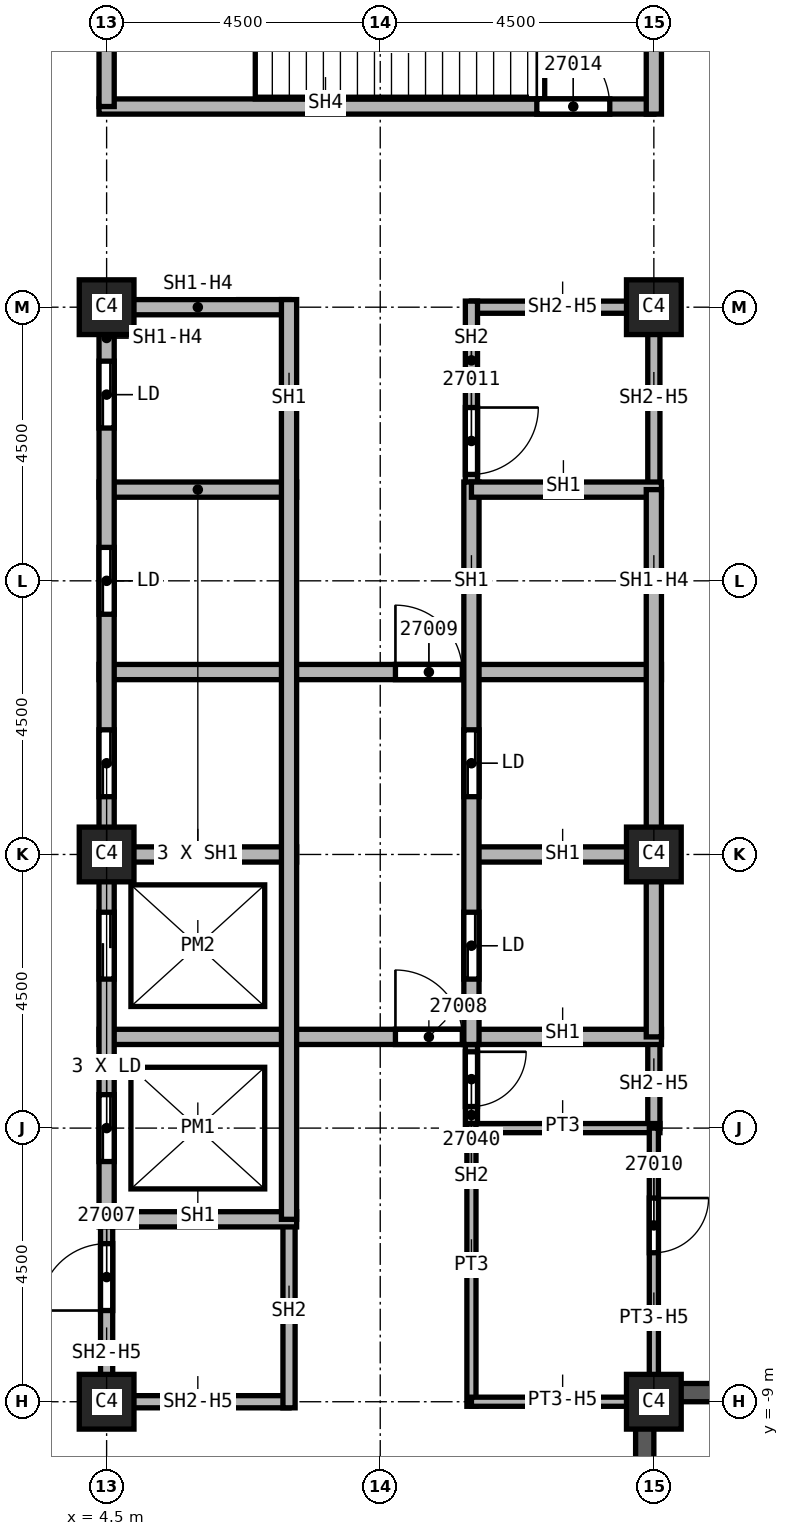
"""IFC4 building model, lengths in metres.
Left out: names, types, materials, properties, quantities, classifications, styles, units other than length and angle.
Written with IfcOpenShell. Run it as: python <this file> out.ifc"""

import sys

from ifc_helpers import new_model, si_unit, direction, frame, frame_2d, origin, origin_2d, place, context, subcontext, project, spatial, rectangle, extrude, element, fill, save


model = new_model("IFC4")
c1 = context("Model", 3, precision=1e-05, world=origin(), true_north=direction((0.0, 1.0)))
c2 = subcontext(c1, "Body", "Model", "MODEL_VIEW")
j1 = project(units=[si_unit("LENGTHUNIT", "METRE"), si_unit("PLANEANGLEUNIT", "RADIAN")], contexts=[c1])
p1 = place(None, origin())
s1 = spatial("IfcSite", under=j1, at=p1, CompositionType="ELEMENT")
p2 = place(p1, origin())
s2 = spatial("IfcBuilding", under=s1, at=p2, CompositionType="ELEMENT")
p3 = place(p2, frame((0.0, 0.0, 178.0)))
s3 = spatial("IfcBuildingStorey", under=s2, at=p3, CompositionType="ELEMENT", Elevation=178.0)
for number, where, z_axis, x_axis in (
    (1, (4.5, 0.0, 0.0), (0.0, 0.0, 1.0), (1.0, 0.0, 0.0)),
    (2, (4.5, 9.0, 0.0), (0.0, 0.0, 1.0), (1.0, 0.0, 0.0)),
    (3, (4.5, -9.0, 0.0), (0.0, 0.0, 1.0), (1.0, 0.0, 0.0)),
    (4, (13.5, 0.0, 0.0), (0.0, 0.0, 1.0), (1.0, 0.0, 0.0)),
    (5, (13.5, 9.0, 0.0), (0.0, 0.0, 1.0), (1.0, 0.0, 0.0)),
    (6, (13.5, -9.0, 0.0), (0.0, 0.0, 1.0), (1.0, 0.0, 0.0)),
):
    element("IfcColumn", number, at=place(p3, frame(where, z_axis=z_axis, x_axis=x_axis)), inside=s3, PredefinedType="COLUMN", context=c2, shape_type="SweptSolid", body=[
        extrude(rectangle(XDim=0.9, YDim=0.9, at=origin_2d()), origin(), (0.0, 0.0, 1.0), 5.72),
    ])
p4 = place(p3, frame((13.35, -9.025, 0.0), z_axis=(0.0, 0.0, 1.0), x_axis=(0.0, -1.0, 0.0)))
e7 = element("IfcWall", 7, at=p4, inside=s3, PredefinedType="SOLIDWALL", context=c2, shape_type="SweptSolid", body=[
    extrude(rectangle(XDim=8.425, YDim=0.3, at=frame_2d((4.212, 0.0))), origin(), (0.0, 0.0, 1.0), 5.12),
])
p5 = place(p4, frame((2.975, 0.0, 0.0)))
e8 = element("IfcOpeningElement", 8, at=p5, cuts=e7, PredefinedType="OPENING", context=c2, shape_type="SweptSolid", body=[
    extrude(rectangle(XDim=1.2, YDim=2.4, at=frame_2d((0.6, 1.2))), frame((0.0, 0.15, 0.0), z_axis=(0.0, -1.0, 0.0), x_axis=(1.0, 0.0, 0.0)), (0.0, 0.0, 1.0), 0.3),
])
p6 = place(p3, frame((13.525, -8.85, 0.0), z_axis=(0.0, 0.0, 1.0), x_axis=(1.0, 0.0, 0.0)))
e9 = element("IfcWall", 9, at=p6, inside=s3, PredefinedType="SOLIDWALL", context=c2, shape_type="SweptSolid", body=[
    extrude(rectangle(XDim=8.425, YDim=0.3, at=frame_2d((4.212, 0.0))), origin(), (0.0, 0.0, 1.0), 5.12),
])
p7 = place(p3, frame((4.5, -9.1, 0.0), z_axis=(0.0, 0.0, 1.0), x_axis=(0.0, 1.0, 0.0)))
e10 = element("IfcWall", 10, at=p7, inside=s3, PredefinedType="SOLIDWALL", context=c2, shape_type="SweptSolid", body=[
    extrude(rectangle(XDim=3.1, YDim=0.2, at=frame_2d((1.55, 0.0))), origin(), (0.0, 0.0, 1.0), 4.958),
])
p8 = place(p7, frame((1.6, 0.0, 0.0)))
e11 = element("IfcOpeningElement", 11, at=p8, cuts=e10, PredefinedType="OPENING", context=c2, shape_type="SweptSolid", body=[
    extrude(rectangle(XDim=1.1, YDim=2.1, at=frame_2d((0.55, 1.05))), frame((0.0, 0.1, 0.0), z_axis=(0.0, -1.0, 0.0), x_axis=(1.0, 0.0, 0.0)), (0.0, 0.0, 1.0), 0.2),
])
p9 = place(p3, frame((7.5, -9.0, 0.0), z_axis=(0.0, 0.0, 1.0), x_axis=(-1.0, 0.0, 0.0)))
e12 = element("IfcWall", 12, at=p9, inside=s3, PredefinedType="SOLIDWALL", context=c2, shape_type="SweptSolid", body=[
    extrude(rectangle(XDim=3.0, YDim=0.2, at=frame_2d((1.5, 0.0))), origin(), (0.0, 0.0, 1.0), 4.958),
])
p10 = place(p3, frame((7.5, -6.0, 0.0), z_axis=(0.0, 0.0, 1.0), x_axis=(0.0, -1.0, 0.0)))
e13 = element("IfcWall", 13, at=p10, inside=s3, PredefinedType="SOLIDWALL", context=c2, shape_type="SweptSolid", body=[
    extrude(rectangle(XDim=3.1, YDim=0.2, at=frame_2d((1.55, 0.0))), origin(), (0.0, 0.0, 1.0), 5.72),
])
p11 = place(p3, frame((10.5, -2.875, 0.0), z_axis=(0.0, 0.0, 1.0), x_axis=(0.0, -1.0, 0.0)))
e14 = element("IfcWall", 14, at=p11, inside=s3, PredefinedType="SOLIDWALL", context=c2, shape_type="SweptSolid", body=[
    extrude(rectangle(XDim=1.7, YDim=0.2, at=frame_2d((0.85, 0.0))), origin(), (0.0, 0.0, 1.0), 5.72),
])
p12 = place(p11, frame((0.37, 0.0, 0.0)))
e15 = element("IfcOpeningElement", 15, at=p12, cuts=e14, PredefinedType="OPENING", context=c2, shape_type="SweptSolid", body=[
    extrude(rectangle(XDim=0.9, YDim=2.1, at=frame_2d((0.45, 1.05))), frame((0.0, 0.1, 0.0), z_axis=(0.0, -1.0, 0.0), x_axis=(1.0, 0.0, 0.0)), (0.0, 0.0, 1.0), 0.2),
])
p13 = place(p3, frame((10.5, 9.0, 0.0), z_axis=(0.0, 0.0, 1.0), x_axis=(1.0, 0.0, 0.0)))
e16 = element("IfcWall", 16, at=p13, inside=s3, PredefinedType="SOLIDWALL", context=c2, shape_type="SweptSolid", body=[
    extrude(rectangle(XDim=3.0, YDim=0.2, at=frame_2d((1.5, 0.0))), origin(), (0.0, 0.0, 1.0), 4.958),
])
p14 = place(p3, frame((10.5, 9.1, 0.0), z_axis=(0.0, 0.0, 1.0), x_axis=(0.0, -1.0, 0.0)))
e17 = element("IfcWall", 17, at=p14, inside=s3, PredefinedType="SOLIDWALL", context=c2, shape_type="SweptSolid", body=[
    extrude(rectangle(XDim=3.225, YDim=0.2, at=frame_2d((1.613, 0.0))), origin(), (0.0, 0.0, 1.0), 5.72),
])
p15 = place(p14, frame((1.75, 0.0, 0.0)))
e18 = element("IfcOpeningElement", 18, at=p15, cuts=e17, PredefinedType="OPENING", context=c2, shape_type="SweptSolid", body=[
    extrude(rectangle(XDim=1.1, YDim=2.1, at=frame_2d((0.55, 1.05))), frame((0.0, 0.1, 0.0), z_axis=(0.0, -1.0, 0.0), x_axis=(1.0, 0.0, 0.0)), (0.0, 0.0, 1.0), 0.2),
])
p16 = place(p3, frame((13.5, -3.0, 0.0), z_axis=(0.0, 0.0, 1.0), x_axis=(0.0, -1.0, 0.0)))
e19 = element("IfcWall", 19, at=p16, inside=s3, PredefinedType="SOLIDWALL", context=c2, shape_type="SweptSolid", body=[
    extrude(rectangle(XDim=1.5, YDim=0.2, at=frame_2d((0.75, 0.0))), origin(), (0.0, 0.0, 1.0), 4.958),
])
p17 = place(p3, frame((13.5, 9.1, 0.0), z_axis=(0.0, 0.0, 1.0), x_axis=(0.0, -1.0, 0.0)))
e20 = element("IfcWall", 20, at=p17, inside=s3, PredefinedType="SOLIDWALL", context=c2, shape_type="SweptSolid", body=[
    extrude(rectangle(XDim=3.1, YDim=0.2, at=frame_2d((1.55, 0.0))), origin(), (0.0, 0.0, 1.0), 4.958),
])
p18 = place(p3, frame((4.375, -6.0, 0.0), z_axis=(0.0, 0.0, 1.0), x_axis=(1.0, 0.0, 0.0)))
e21 = element("IfcWall", 21, at=p18, inside=s3, PredefinedType="SOLIDWALL", context=c2, shape_type="SweptSolid", body=[
    extrude(rectangle(XDim=3.25, YDim=0.25, at=frame_2d((1.625, 0.0))), origin(), (0.0, 0.0, 1.0), 5.72),
])
p19 = place(p3, frame((4.375, -3.0, 0.0), z_axis=(0.0, 0.0, 1.0), x_axis=(1.0, 0.0, 0.0)))
e22 = element("IfcWall", 22, at=p19, inside=s3, PredefinedType="SOLIDWALL", context=c2, shape_type="SweptSolid", body=[
    extrude(rectangle(XDim=9.25, YDim=0.25, at=frame_2d((4.625, 0.0))), origin(), (0.0, 0.0, 1.0), 5.72),
])
p20 = place(p19, frame((4.875, 0.0, 0.0)))
e23 = element("IfcOpeningElement", 23, at=p20, cuts=e22, PredefinedType="OPENING", context=c2, shape_type="SweptSolid", body=[
    extrude(rectangle(XDim=1.1, YDim=2.1, at=frame_2d((0.55, 1.05))), frame((0.0, 0.125, 0.0), z_axis=(0.0, -1.0, 0.0), x_axis=(1.0, 0.0, 0.0)), (0.0, 0.0, 1.0), 0.25),
])
p21 = place(p3, frame((4.375, 0.0, 0.0), z_axis=(0.0, 0.0, 1.0), x_axis=(1.0, 0.0, 0.0)))
e24 = element("IfcWall", 24, at=p21, inside=s3, PredefinedType="SOLIDWALL", context=c2, shape_type="SweptSolid", body=[
    extrude(rectangle(XDim=3.25, YDim=0.25, at=frame_2d((1.625, 0.0))), origin(), (0.0, 0.0, 1.0), 5.72),
])
p22 = place(p3, frame((4.375, 3.0, 0.0), z_axis=(0.0, 0.0, 1.0), x_axis=(1.0, 0.0, 0.0)))
e25 = element("IfcWall", 25, at=p22, inside=s3, PredefinedType="SOLIDWALL", context=c2, shape_type="SweptSolid", body=[
    extrude(rectangle(XDim=9.25, YDim=0.25, at=frame_2d((4.625, 0.0))), origin(), (0.0, 0.0, 1.0), 5.72),
])
p23 = place(p22, frame((4.875, 0.0, 0.0)))
e26 = element("IfcOpeningElement", 26, at=p23, cuts=e25, PredefinedType="OPENING", context=c2, shape_type="SweptSolid", body=[
    extrude(rectangle(XDim=1.1, YDim=2.1, at=frame_2d((0.55, 1.05))), frame((0.0, 0.125, 0.0), z_axis=(0.0, -1.0, 0.0), x_axis=(1.0, 0.0, 0.0)), (0.0, 0.0, 1.0), 0.25),
])
p24 = place(p3, frame((4.375, 6.0, 0.0), z_axis=(0.0, 0.0, 1.0), x_axis=(1.0, 0.0, 0.0)))
e27 = element("IfcWall", 27, at=p24, inside=s3, PredefinedType="SOLIDWALL", context=c2, shape_type="SweptSolid", body=[
    extrude(rectangle(XDim=3.25, YDim=0.25, at=frame_2d((1.625, 0.0))), origin(), (0.0, 0.0, 1.0), 5.72),
])
p25 = place(p3, frame((4.5, -6.0, 0.0), z_axis=(0.0, 0.0, 1.0), x_axis=(0.0, 1.0, 0.0)))
e28 = element("IfcWall", 28, at=p25, inside=s3, PredefinedType="SOLIDWALL", context=c2, shape_type="SweptSolid", body=[
    extrude(rectangle(XDim=15.125, YDim=0.25, at=frame_2d((7.562, 0.0))), origin(), (0.0, 0.0, 1.0), 4.958),
])
p26 = place(p25, frame((0.95, 0.0, 0.0)))
e29 = element("IfcOpeningElement", 29, at=p26, cuts=e28, PredefinedType="OPENING", context=c2, shape_type="SweptSolid", body=[
    extrude(rectangle(XDim=1.1, YDim=2.1, at=frame_2d((0.55, 1.05))), frame((0.0, 0.125, 0.0), z_axis=(0.0, -1.0, 0.0), x_axis=(1.0, 0.0, 0.0)), (0.0, 0.0, 1.0), 0.25),
])
p27 = place(p25, frame((3.95, 0.0, 0.0)))
e30 = element("IfcOpeningElement", 30, at=p27, cuts=e28, PredefinedType="OPENING", context=c2, shape_type="SweptSolid", body=[
    extrude(rectangle(XDim=1.1, YDim=2.1, at=frame_2d((0.55, 1.05))), frame((0.0, 0.125, 0.0), z_axis=(0.0, -1.0, 0.0), x_axis=(1.0, 0.0, 0.0)), (0.0, 0.0, 1.0), 0.25),
])
p28 = place(p25, frame((6.95, 0.0, 0.0)))
e31 = element("IfcOpeningElement", 31, at=p28, cuts=e28, PredefinedType="OPENING", context=c2, shape_type="SweptSolid", body=[
    extrude(rectangle(XDim=1.1, YDim=2.1, at=frame_2d((0.55, 1.05))), frame((0.0, 0.125, 0.0), z_axis=(0.0, -1.0, 0.0), x_axis=(1.0, 0.0, 0.0)), (0.0, 0.0, 1.0), 0.25),
])
p29 = place(p25, frame((9.95, 0.0, 0.0)))
e32 = element("IfcOpeningElement", 32, at=p29, cuts=e28, PredefinedType="OPENING", context=c2, shape_type="SweptSolid", body=[
    extrude(rectangle(XDim=1.1, YDim=2.1, at=frame_2d((0.55, 1.05))), frame((0.0, 0.125, 0.0), z_axis=(0.0, -1.0, 0.0), x_axis=(1.0, 0.0, 0.0)), (0.0, 0.0, 1.0), 0.25),
])
p30 = place(p25, frame((13.012, 0.0, 0.0)))
e33 = element("IfcOpeningElement", 33, at=p30, cuts=e28, PredefinedType="OPENING", context=c2, shape_type="SweptSolid", body=[
    extrude(rectangle(XDim=1.1, YDim=2.1, at=frame_2d((0.55, 1.05))), frame((0.0, 0.125, 0.0), z_axis=(0.0, -1.0, 0.0), x_axis=(1.0, 0.0, 0.0)), (0.0, 0.0, 1.0), 0.25),
])
p31 = place(p3, frame((4.5, 9.0, 0.0), z_axis=(0.0, 0.0, 1.0), x_axis=(1.0, 0.0, 0.0)))
e34 = element("IfcWall", 34, at=p31, inside=s3, PredefinedType="SOLIDWALL", context=c2, shape_type="SweptSolid", body=[
    extrude(rectangle(XDim=3.0, YDim=0.25, at=frame_2d((1.5, 0.0))), origin(), (0.0, 0.0, 1.0), 4.958),
])
p32 = place(p3, frame((7.5, 9.125, 0.0), z_axis=(0.0, 0.0, 1.0), x_axis=(0.0, -1.0, 0.0)))
e35 = element("IfcWall", 35, at=p32, inside=s3, PredefinedType="SOLIDWALL", context=c2, shape_type="SweptSolid", body=[
    extrude(rectangle(XDim=15.125, YDim=0.25, at=frame_2d((7.562, 0.0))), origin(), (0.0, 0.0, 1.0), 5.72),
])
p33 = place(p3, frame((10.5, 0.0, 0.0), z_axis=(0.0, 0.0, 1.0), x_axis=(1.0, 0.0, 0.0)))
e36 = element("IfcWall", 36, at=p33, inside=s3, PredefinedType="SOLIDWALL", context=c2, shape_type="SweptSolid", body=[
    extrude(rectangle(XDim=3.125, YDim=0.25, at=frame_2d((1.562, 0.0))), origin(), (0.0, 0.0, 1.0), 5.72),
])
p34 = place(p3, frame((10.5, 6.125, 0.0), z_axis=(0.0, 0.0, 1.0), x_axis=(0.0, -1.0, 0.0)))
e37 = element("IfcWall", 37, at=p34, inside=s3, PredefinedType="SOLIDWALL", context=c2, shape_type="SweptSolid", body=[
    extrude(rectangle(XDim=9.25, YDim=0.25, at=frame_2d((4.625, 0.0))), origin(), (0.0, 0.0, 1.0), 5.72),
])
p35 = place(p34, frame((7.075, 0.0, 0.0)))
e38 = element("IfcOpeningElement", 38, at=p35, cuts=e37, PredefinedType="OPENING", context=c2, shape_type="SweptSolid", body=[
    extrude(rectangle(XDim=1.1, YDim=2.1, at=frame_2d((0.55, 1.05))), frame((0.0, 0.125, 0.0), z_axis=(0.0, -1.0, 0.0), x_axis=(1.0, 0.0, 0.0)), (0.0, 0.0, 1.0), 0.25),
])
p36 = place(p34, frame((4.075, 0.0, 0.0)))
e39 = element("IfcOpeningElement", 39, at=p36, cuts=e37, PredefinedType="OPENING", context=c2, shape_type="SweptSolid", body=[
    extrude(rectangle(XDim=1.1, YDim=2.1, at=frame_2d((0.55, 1.05))), frame((0.0, 0.125, 0.0), z_axis=(0.0, -1.0, 0.0), x_axis=(1.0, 0.0, 0.0)), (0.0, 0.0, 1.0), 0.25),
])
p37 = place(p3, frame((10.5, 6.0, 0.0), z_axis=(0.0, 0.0, 1.0), x_axis=(1.0, 0.0, 0.0)))
e40 = element("IfcWall", 40, at=p37, inside=s3, PredefinedType="SOLIDWALL", context=c2, shape_type="SweptSolid", body=[
    extrude(rectangle(XDim=3.125, YDim=0.25, at=frame_2d((1.562, 0.0))), origin(), (0.0, 0.0, 1.0), 5.72),
])
p38 = place(p3, frame((13.5, 6.0, 0.0), z_axis=(0.0, 0.0, 1.0), x_axis=(0.0, -1.0, 0.0)))
e41 = element("IfcWall", 41, at=p38, inside=s3, PredefinedType="SOLIDWALL", context=c2, shape_type="SweptSolid", body=[
    extrude(rectangle(XDim=9.0, YDim=0.25, at=frame_2d((4.5, 0.0))), origin(), (0.0, 0.0, 1.0), 4.958),
])
p39 = place(p3, frame((4.375, 12.3, 0.0), z_axis=(0.0, 0.0, 1.0), x_axis=(1.0, 0.0, 0.0)))
e42 = element("IfcWall", 42, at=p39, inside=s3, PredefinedType="SOLIDWALL", context=c2, shape_type="SweptSolid", body=[
    extrude(rectangle(XDim=9.125, YDim=0.25, at=frame_2d((4.562, 0.0))), origin(), (0.0, 0.0, 1.0), 5.72),
])
p40 = place(p39, frame((7.2, 0.0, 0.0)))
e43 = element("IfcOpeningElement", 43, at=p40, cuts=e42, PredefinedType="OPENING", context=c2, shape_type="SweptSolid", body=[
    extrude(rectangle(XDim=1.2, YDim=2.1, at=frame_2d((0.6, 1.05))), frame((0.0, 0.125, 0.0), z_axis=(0.0, -1.0, 0.0), x_axis=(1.0, 0.0, 0.0)), (0.0, 0.0, 1.0), 0.25),
])
p41 = place(p3, frame((4.5, 12.3, 0.0), z_axis=(0.0, 0.0, 1.0), x_axis=(0.0, 1.0, 0.0)))
e44 = element("IfcWall", 44, at=p41, inside=s3, PredefinedType="SOLIDWALL", context=c2, shape_type="SweptSolid", body=[
    extrude(rectangle(XDim=4.5, YDim=0.25, at=frame_2d((2.25, 0.0))), origin(), (0.0, 0.0, 1.0), 5.72),
])
p42 = place(p3, frame((13.5, 12.175, 0.0), z_axis=(0.0, 0.0, 1.0), x_axis=(0.0, 1.0, 0.0)))
e45 = element("IfcWall", 45, at=p42, inside=s3, PredefinedType="SOLIDWALL", context=c2, shape_type="SweptSolid", body=[
    extrude(rectangle(XDim=4.75, YDim=0.25, at=frame_2d((2.375, 0.0))), origin(), (0.0, 0.0, 1.0), 5.72),
])
p43 = place(p3, frame((10.5, -4.5, 0.0), z_axis=(0.0, 0.0, 1.0), x_axis=(1.0, 0.0, 0.0)))
e46 = element("IfcWall", 46, at=p43, inside=s3, PredefinedType="PARTITIONING", context=c2, shape_type="SweptSolid", body=[
    extrude(rectangle(XDim=3.1, YDim=0.15, at=frame_2d((1.55, 0.0))), origin(), (0.0, 0.0, 1.0), 5.72),
])
p44 = place(p3, frame((10.5, -4.425, 0.0), z_axis=(0.0, 0.0, 1.0), x_axis=(0.0, -1.0, 0.0)))
e47 = element("IfcWall", 47, at=p44, inside=s3, PredefinedType="PARTITIONING", context=c2, shape_type="SweptSolid", body=[
    extrude(rectangle(XDim=4.65, YDim=0.15, at=frame_2d((2.325, 0.0))), origin(), (0.0, 0.0, 1.0), 5.72),
])
p45 = place(p3, frame((13.5, -9.0, 0.0), z_axis=(0.0, 0.0, 1.0), x_axis=(-1.0, 0.0, 0.0)))
e48 = element("IfcWall", 48, at=p45, inside=s3, PredefinedType="PARTITIONING", context=c2, shape_type="SweptSolid", body=[
    extrude(rectangle(XDim=3.0, YDim=0.15, at=frame_2d((1.5, 0.0))), origin(), (0.0, 0.0, 1.0), 4.958),
])
p46 = place(p3, frame((13.5, -4.5, 0.0), z_axis=(0.0, 0.0, 1.0), x_axis=(0.0, -1.0, 0.0)))
e49 = element("IfcWall", 49, at=p46, inside=s3, PredefinedType="PARTITIONING", context=c2, shape_type="SweptSolid", body=[
    extrude(rectangle(XDim=4.525, YDim=0.15, at=frame_2d((2.262, 0.0))), origin(), (0.0, 0.0, 1.0), 4.958),
])
p47 = place(p46, frame((1.15, 0.0, 0.0)))
e50 = element("IfcOpeningElement", 50, at=p47, cuts=e49, PredefinedType="OPENING", context=c2, shape_type="SweptSolid", body=[
    extrude(rectangle(XDim=0.9, YDim=2.1, at=frame_2d((0.45, 1.05))), frame((0.0, 0.075, 0.0), z_axis=(0.0, -1.0, 0.0), x_axis=(1.0, 0.0, 0.0)), (0.0, 0.0, 1.0), 0.15),
])
p48 = place(p8, origin())
e51 = element("IfcDoor", 51, at=p48, inside=s3, OperationType="SINGLE_SWING_RIGHT", PredefinedType="DOOR", context=c2, shape_type="SweptSolid", body=[
    extrude(rectangle(XDim=1.1, YDim=2.1, at=frame_2d((0.55, 1.05))), frame((0.0, 0.025, 0.0), z_axis=(0.0, -1.0, 0.0), x_axis=(1.0, 0.0, 0.0)), (0.0, 0.0, 1.0), 0.05),
])
fill(e11, e51)
p49 = place(p20, origin())
e52 = element("IfcDoor", 52, at=p49, inside=s3, OperationType="SINGLE_SWING_LEFT", PredefinedType="DOOR", context=c2, shape_type="SweptSolid", body=[
    extrude(rectangle(XDim=1.1, YDim=2.1, at=frame_2d((0.55, 1.05))), frame((0.0, 0.025, 0.0), z_axis=(0.0, -1.0, 0.0), x_axis=(1.0, 0.0, 0.0)), (0.0, 0.0, 1.0), 0.05),
])
fill(e23, e52)
p50 = place(p23, origin())
e53 = element("IfcDoor", 53, at=p50, inside=s3, OperationType="SINGLE_SWING_RIGHT", PredefinedType="DOOR", context=c2, shape_type="SweptSolid", body=[
    extrude(rectangle(XDim=1.1, YDim=2.1, at=frame_2d((0.55, 1.05))), frame((0.0, 0.025, 0.0), z_axis=(0.0, -1.0, 0.0), x_axis=(1.0, 0.0, 0.0)), (0.0, 0.0, 1.0), 0.05),
])
fill(e26, e53)
p51 = place(p47, origin())
e54 = element("IfcDoor", 54, at=p51, inside=s3, OperationType="SINGLE_SWING_LEFT", PredefinedType="DOOR", context=c2, shape_type="SweptSolid", body=[
    extrude(rectangle(XDim=0.9, YDim=2.1, at=frame_2d((0.45, 1.05))), frame((0.0, 0.025, 0.0), z_axis=(0.0, -1.0, 0.0), x_axis=(1.0, 0.0, 0.0)), (0.0, 0.0, 1.0), 0.05),
])
fill(e50, e54)
p52 = place(p15, origin())
e55 = element("IfcDoor", 55, at=p52, inside=s3, OperationType="SINGLE_SWING_RIGHT", PredefinedType="DOOR", context=c2, shape_type="SweptSolid", body=[
    extrude(rectangle(XDim=1.1, YDim=2.1, at=frame_2d((0.55, 1.05))), frame((0.0, 0.025, 0.0), z_axis=(0.0, -1.0, 0.0), x_axis=(1.0, 0.0, 0.0)), (0.0, 0.0, 1.0), 0.05),
])
fill(e18, e55)
p53 = place(p40, origin())
e56 = element("IfcDoor", 56, at=p53, inside=s3, OperationType="SINGLE_SWING_LEFT", PredefinedType="DOOR", context=c2, shape_type="SweptSolid", body=[
    extrude(rectangle(XDim=1.2, YDim=2.1, at=frame_2d((0.6, 1.05))), frame((0.0, 0.025, 0.0), z_axis=(0.0, -1.0, 0.0), x_axis=(1.0, 0.0, 0.0)), (0.0, 0.0, 1.0), 0.05),
])
fill(e43, e56)
p54 = place(p12, origin())
e57 = element("IfcDoor", 57, at=p54, inside=s3, OperationType="SINGLE_SWING_LEFT", PredefinedType="DOOR", context=c2, shape_type="SweptSolid", body=[
    extrude(rectangle(XDim=0.9, YDim=2.1, at=frame_2d((0.45, 1.05))), frame((0.0, 0.025, 0.0), z_axis=(0.0, -1.0, 0.0), x_axis=(1.0, 0.0, 0.0)), (0.0, 0.0, 1.0), 0.05),
])
fill(e15, e57)
p55 = place(p26, origin())
e58 = element("IfcDoor", 58, at=p55, inside=s3, OperationType="SLIDING_TO_LEFT", PredefinedType="DOOR", context=c2, shape_type="SweptSolid", body=[
    extrude(rectangle(XDim=1.1, YDim=2.1, at=frame_2d((0.55, 1.05))), frame((0.0, 0.025, 0.0), z_axis=(0.0, -1.0, 0.0), x_axis=(1.0, 0.0, 0.0)), (0.0, 0.0, 1.0), 0.05),
])
fill(e29, e58)
p56 = place(p27, origin())
e59 = element("IfcDoor", 59, at=p56, inside=s3, OperationType="SLIDING_TO_LEFT", PredefinedType="DOOR", context=c2, shape_type="SweptSolid", body=[
    extrude(rectangle(XDim=1.1, YDim=2.1, at=frame_2d((0.55, 1.05))), frame((0.0, 0.025, 0.0), z_axis=(0.0, -1.0, 0.0), x_axis=(1.0, 0.0, 0.0)), (0.0, 0.0, 1.0), 0.05),
])
fill(e30, e59)
p57 = place(p28, origin())
e60 = element("IfcDoor", 60, at=p57, inside=s3, OperationType="SLIDING_TO_LEFT", PredefinedType="DOOR", context=c2, shape_type="SweptSolid", body=[
    extrude(rectangle(XDim=1.1, YDim=2.1, at=frame_2d((0.55, 1.05))), frame((0.0, 0.025, 0.0), z_axis=(0.0, -1.0, 0.0), x_axis=(1.0, 0.0, 0.0)), (0.0, 0.0, 1.0), 0.05),
])
fill(e31, e60)
p58 = place(p29, origin())
e61 = element("IfcDoor", 61, at=p58, inside=s3, OperationType="SLIDING_TO_LEFT", PredefinedType="DOOR", context=c2, shape_type="SweptSolid", body=[
    extrude(rectangle(XDim=1.1, YDim=2.1, at=frame_2d((0.55, 1.05))), frame((0.0, 0.025, 0.0), z_axis=(0.0, -1.0, 0.0), x_axis=(1.0, 0.0, 0.0)), (0.0, 0.0, 1.0), 0.05),
])
fill(e32, e61)
p59 = place(p30, origin())
e62 = element("IfcDoor", 62, at=p59, inside=s3, OperationType="SLIDING_TO_LEFT", PredefinedType="DOOR", context=c2, shape_type="SweptSolid", body=[
    extrude(rectangle(XDim=1.1, YDim=2.1, at=frame_2d((0.55, 1.05))), frame((0.0, 0.025, 0.0), z_axis=(0.0, -1.0, 0.0), x_axis=(1.0, 0.0, 0.0)), (0.0, 0.0, 1.0), 0.05),
])
fill(e33, e62)
p60 = place(p35, origin())
e63 = element("IfcDoor", 63, at=p60, inside=s3, OperationType="SLIDING_TO_LEFT", PredefinedType="DOOR", context=c2, shape_type="SweptSolid", body=[
    extrude(rectangle(XDim=1.1, YDim=2.1, at=frame_2d((0.55, 1.05))), frame((0.0, 0.025, 0.0), z_axis=(0.0, -1.0, 0.0), x_axis=(1.0, 0.0, 0.0)), (0.0, 0.0, 1.0), 0.05),
])
fill(e38, e63)
p61 = place(p36, origin())
e64 = element("IfcDoor", 64, at=p61, inside=s3, OperationType="SLIDING_TO_LEFT", PredefinedType="DOOR", context=c2, shape_type="SweptSolid", body=[
    extrude(rectangle(XDim=1.1, YDim=2.1, at=frame_2d((0.55, 1.05))), frame((0.0, 0.025, 0.0), z_axis=(0.0, -1.0, 0.0), x_axis=(1.0, 0.0, 0.0)), (0.0, 0.0, 1.0), 0.05),
])
fill(e39, e64)
save(model, sys.argv[1])
